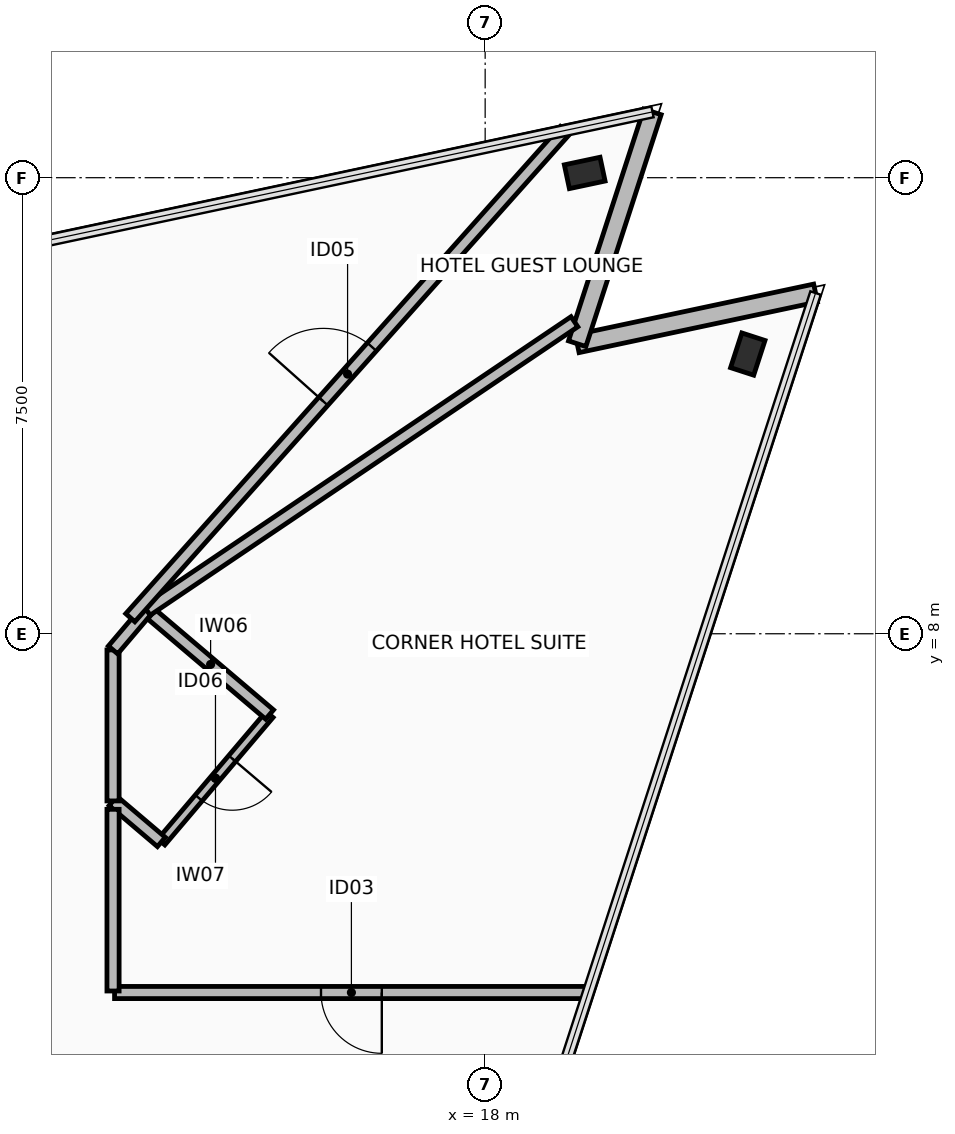
"""IFC4 building model, lengths in metres.
Left out: names, types, materials, properties, quantities, classifications, styles, units other than length and angle.
Written with IfcOpenShell. Run it as: python <this file> out.ifc"""

import sys

from ifc_helpers import new_model, si_unit, direction, frame, frame_2d, origin, origin_2d, place, context, subcontext, project, spatial, rectangle, hollow_rectangle, extrude, element, fill, save


model = new_model("IFC4")
c1 = context("Model", 3, precision=1e-05, world=origin(), true_north=direction((0.0, 1.0)))
c2 = subcontext(c1, "Body", "Model", "MODEL_VIEW")
j1 = project(units=[si_unit("LENGTHUNIT", "METRE"), si_unit("PLANEANGLEUNIT", "RADIAN")], contexts=[c1])
p1 = place(None, origin())
s1 = spatial("IfcSite", under=j1, at=p1, CompositionType="ELEMENT")
p2 = place(p1, origin())
s2 = spatial("IfcBuilding", under=s1, at=p2, CompositionType="ELEMENT")
p3 = place(p2, frame((0.0, 0.0, 287.05)))
s3 = spatial("IfcBuildingStorey", under=s2, at=p3, CompositionType="ELEMENT", Elevation=287.05)
for number, where, z_axis, x_axis in (
    (1, (22.319, 12.6, 0.0), (0.0, 0.0, 1.0), (0.309, 0.951, 0.0)),
    (2, (19.637, 15.578, 0.0), (0.0, 0.0, 1.0), (0.978, 0.208, 0.0)),
):
    element("IfcColumn", number, at=place(p3, frame(where, z_axis=z_axis, x_axis=x_axis)), inside=s3, PredefinedType="COLUMN", context=c2, shape_type="SweptSolid", body=[
        extrude(hollow_rectangle(XDim=0.4, YDim=0.6, WallThickness=0.03, at=origin_2d()), origin(), (0.0, 0.0, 1.0), 3.65),
    ])
p4 = place(p3, frame((23.434, 13.603, 0.0), z_axis=(0.0, 0.0, 1.0), x_axis=(-0.97815049033, -0.207898095871, 0.0)))
e3 = element("IfcWall", 3, at=p4, inside=s3, PredefinedType="STANDARD", context=c2, shape_type="SweptSolid", body=[
    extrude(rectangle(XDim=4.008, YDim=0.3, at=frame_2d((2.004, 0.0))), origin(), (0.0, 0.0, 1.0), 2.81),
])
p5 = place(p3, frame((19.513, 12.77, 0.0), z_axis=(0.0, 0.0, 1.0), x_axis=(0.309018580232, 0.951056001018, 0.0)))
e4 = element("IfcWall", 4, at=p5, inside=s3, PredefinedType="STANDARD", context=c2, shape_type="SweptSolid", body=[
    extrude(rectangle(XDim=4.008, YDim=0.3, at=frame_2d((2.004, 0.0))), origin(), (0.0, 0.0, 1.0), 2.81),
])
p6 = place(p3, frame((14.455, 6.672, 0.0), z_axis=(0.0, 0.0, 1.0), x_axis=(-0.647230821936, -0.762294079169, 0.0)))
e5 = element("IfcWall", 5, at=p6, inside=s3, PredefinedType="PARTITIONING", context=c2, shape_type="SweptSolid", body=[
    extrude(rectangle(XDim=2.75, YDim=0.15, at=frame_2d((1.375, 0.0))), origin(), (0.0, 0.0, 1.0), 3.465),
])
p7 = place(p6, frame((0.95, 0.0, 0.0)))
e6 = element("IfcOpeningElement", 6, at=p7, cuts=e5, PredefinedType="OPENING", context=c2, shape_type="SweptSolid", body=[
    extrude(rectangle(XDim=0.85, YDim=2.1, at=frame_2d((0.425, 1.05))), frame((0.0, 0.085, 0.0), z_axis=(0.0, -1.0, 0.0), x_axis=(1.0, 0.0, 0.0)), (0.0, 0.0, 1.0), 0.17),
])
p8 = place(p3, frame((12.675, 4.576, 0.0), z_axis=(0.0, 0.0, 1.0), x_axis=(-0.762355104859, 0.647158940366, 0.0)))
e7 = element("IfcWall", 7, at=p8, inside=s3, PredefinedType="PARTITIONING", context=c2, shape_type="SweptSolid", body=[
    extrude(rectangle(XDim=1.043, YDim=0.2, at=frame_2d((0.521, 0.0))), origin(), (0.0, 0.0, 1.0), 3.465),
])
p9 = place(p3, frame((11.88, 5.251, 0.0), z_axis=(0.0, 0.0, 1.0), x_axis=(0.0, 1.0, 0.0)))
e8 = element("IfcWall", 8, at=p9, inside=s3, PredefinedType="PARTITIONING", context=c2, shape_type="SweptSolid", body=[
    extrude(rectangle(XDim=2.483, YDim=0.2, at=frame_2d((1.242, 0.0))), origin(), (0.0, 0.0, 1.0), 3.465),
])
p10 = place(p3, frame((11.88, 7.734, 0.0), z_axis=(0.0, 0.0, 1.0), x_axis=(0.647383821679, 0.7621641473, 0.0)))
e9 = element("IfcWall", 9, at=p10, inside=s3, PredefinedType="PARTITIONING", context=c2, shape_type="SweptSolid", body=[
    extrude(rectangle(XDim=0.857, YDim=0.2, at=frame_2d((0.429, 0.0))), origin(), (0.0, 0.0, 1.0), 3.465),
])
p11 = place(p3, frame((12.515, 8.319, 0.0), z_axis=(0.0, 0.0, 1.0), x_axis=(0.762275325084, -0.647252909432, 0.0)))
e10 = element("IfcWall", 10, at=p11, inside=s3, PredefinedType="PARTITIONING", context=c2, shape_type="SweptSolid", body=[
    extrude(rectangle(XDim=2.545, YDim=0.2, at=frame_2d((1.272, 0.0))), origin(), (0.0, 0.0, 1.0), 3.465),
])
p12 = place(p3, frame((19.696, 2.1, 0.0), z_axis=(0.0, 0.0, 1.0), x_axis=(-1.0, 0.0, 0.0)))
e11 = element("IfcWall", 11, at=p12, inside=s3, PredefinedType="PARTITIONING", context=c2, shape_type="SweptSolid", body=[
    extrude(rectangle(XDim=7.791, YDim=0.2, at=frame_2d((3.896, 0.0))), origin(), (0.0, 0.0, 1.0), 2.81),
])
p13 = place(p12, frame((3.396, 0.0, 0.0)))
e12 = element("IfcOpeningElement", 12, at=p13, cuts=e11, PredefinedType="OPENING", context=c2, shape_type="SweptSolid", body=[
    extrude(rectangle(XDim=1.0, YDim=2.15, at=frame_2d((0.5, 1.075))), frame((0.0, 0.11, 0.0), z_axis=(0.0, -1.0, 0.0), x_axis=(1.0, 0.0, 0.0)), (0.0, 0.0, 1.0), 0.22),
])
p14 = place(p3, frame((11.88, 2.125, 0.0), z_axis=(0.0, 0.0, 1.0), x_axis=(0.0, 1.0, 0.0)))
e13 = element("IfcWall", 13, at=p14, inside=s3, PredefinedType="PARTITIONING", context=c2, shape_type="SweptSolid", body=[
    extrude(rectangle(XDim=2.988, YDim=0.2, at=frame_2d((1.494, 0.0))), origin(), (0.0, 0.0, 1.0), 3.465),
])
p15 = place(p3, frame((12.435, 8.387, 0.0), z_axis=(0.0, 0.0, 1.0), x_axis=(0.82904079251, 0.559188129661, 0.0)))
e14 = element("IfcWall", 14, at=p15, inside=s3, PredefinedType="PARTITIONING", context=c2, shape_type="SweptSolid", body=[
    extrude(rectangle(XDim=8.484, YDim=0.2, at=frame_2d((4.242, 0.0))), origin(), (0.0, 0.0, 1.0), 2.96),
])
p16 = place(p3, frame((12.164, 8.264, 0.0), z_axis=(0.0, 0.0, 1.0), x_axis=(0.665683993265, 0.746233757686, 0.0)))
e15 = element("IfcWall", 15, at=p16, inside=s3, PredefinedType="PARTITIONING", context=c2, shape_type="SweptSolid", body=[
    extrude(rectangle(XDim=10.736, YDim=0.2, at=frame_2d((5.368, 0.0))), origin(), (0.0, 0.0, 1.0), 2.81),
])
p17 = place(p16, frame((4.768, 0.0, 0.0)))
e16 = element("IfcOpeningElement", 16, at=p17, cuts=e15, PredefinedType="OPENING", context=c2, shape_type="SweptSolid", body=[
    extrude(rectangle(XDim=1.2, YDim=2.15, at=frame_2d((0.6, 1.075))), frame((0.0, 0.11, 0.0), z_axis=(0.0, -1.0, 0.0), x_axis=(1.0, 0.0, 0.0)), (0.0, 0.0, 1.0), 0.22),
])
p18 = place(p7, origin())
e17 = element("IfcDoor", 17, at=p18, inside=s3, OperationType="SINGLE_SWING_RIGHT", PredefinedType="DOOR", context=c2, shape_type="SweptSolid", body=[
    extrude(rectangle(XDim=0.85, YDim=2.1, at=frame_2d((0.425, 1.05))), frame((0.0, 0.025, 0.0), z_axis=(0.0, -1.0, 0.0), x_axis=(1.0, 0.0, 0.0)), (0.0, 0.0, 1.0), 0.05),
])
fill(e6, e17)
p19 = place(p13, origin())
e18 = element("IfcDoor", 18, at=p19, inside=s3, OperationType="SINGLE_SWING_LEFT", PredefinedType="DOOR", context=c2, shape_type="SweptSolid", body=[
    extrude(rectangle(XDim=1.0, YDim=2.15, at=frame_2d((0.5, 1.075))), frame((0.0, 0.025, 0.0), z_axis=(0.0, -1.0, 0.0), x_axis=(1.0, 0.0, 0.0)), (0.0, 0.0, 1.0), 0.05),
])
fill(e12, e18)
p20 = place(p17, origin())
e19 = element("IfcDoor", 19, at=p20, inside=s3, OperationType="SINGLE_SWING_LEFT", PredefinedType="DOOR", context=c2, shape_type="SweptSolid", body=[
    extrude(rectangle(XDim=1.2, YDim=2.15, at=frame_2d((0.6, 1.075))), frame((0.0, 0.025, 0.0), z_axis=(0.0, -1.0, 0.0), x_axis=(1.0, 0.0, 0.0)), (0.0, 0.0, 1.0), 0.05),
])
fill(e16, e19)
save(model, sys.argv[1])
